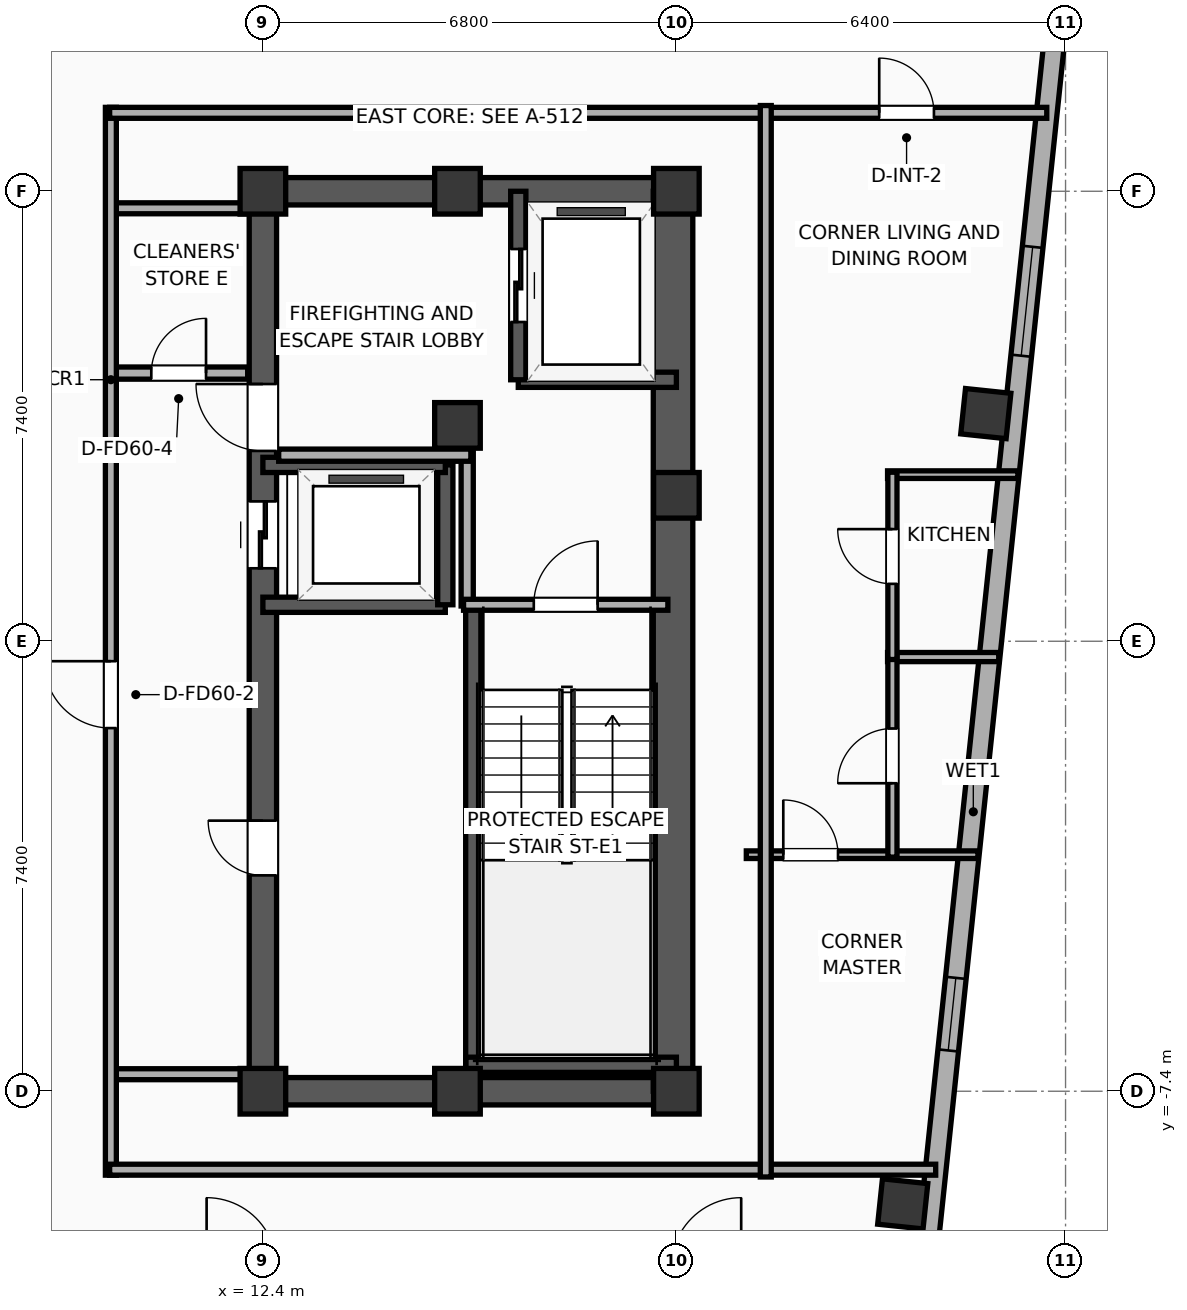
"""IFC4 building model, lengths in metres.
Left out: names, types, materials, properties, quantities, classifications, styles, units other than length and angle.
Written with IfcOpenShell. Run it as: python <this file> out.ifc"""

import sys

from ifc_helpers import new_model, si_unit, direction, frame, frame_2d, origin, origin_2d, place, context, subcontext, project, spatial, rectangle, hollow_rectangle, extrude, element, fill, save


model = new_model("IFC4")
c1 = context("Model", 3, precision=1e-05, world=origin(), true_north=direction((0.0, 1.0)))
c2 = subcontext(c1, "Body", "Model", "MODEL_VIEW")
j1 = project(units=[si_unit("LENGTHUNIT", "METRE"), si_unit("PLANEANGLEUNIT", "RADIAN")], contexts=[c1])
p1 = place(None, origin())
s1 = spatial("IfcSite", under=j1, at=p1, CompositionType="ELEMENT")
p2 = place(p1, origin())
s2 = spatial("IfcBuilding", under=s1, at=p2, CompositionType="ELEMENT")
p3 = place(p2, frame((0.0, 0.0, 267.8)))
s3 = spatial("IfcBuildingStorey", under=s2, at=p3, CompositionType="ELEMENT", Elevation=267.8)
for number, where, z_axis, x_axis in (
    (1, (12.4, -7.4, 0.0), (0.0, 0.0, 1.0), (1.0, 0.0, 0.0)),
    (2, (15.6, 3.55, 0.0), (0.0, 0.0, 1.0), (1.0, 0.0, 0.0)),
    (3, (12.4, 7.4, 0.0), (0.0, 0.0, 1.0), (1.0, 0.0, 0.0)),
    (4, (15.6, -7.4, 0.0), (0.0, 0.0, 1.0), (1.0, 0.0, 0.0)),
    (5, (15.6, 7.4, 0.0), (0.0, 0.0, 1.0), (1.0, 0.0, 0.0)),
    (6, (19.2, -7.4, 0.0), (0.0, 0.0, 1.0), (1.0, 0.0, 0.0)),
    (7, (19.2, 2.4, 0.0), (0.0, 0.0, 1.0), (1.0, 0.0, 0.0)),
    (8, (19.2, 7.4, 0.0), (0.0, 0.0, 1.0), (1.0, 0.0, 0.0)),
):
    element("IfcColumn", number, at=place(p3, frame(where, z_axis=z_axis, x_axis=x_axis)), inside=s3, PredefinedType="COLUMN", context=c2, shape_type="SweptSolid", body=[
        extrude(rectangle(XDim=0.75, YDim=0.75, at=origin_2d()), origin(), (0.0, 0.0, 1.0), 3.9),
    ])
for number, where, z_axis, x_axis in (
    (9, (12.175, -7.4, 0.0), (0.0, 0.0, 1.0), (1.0, 0.0, 0.0)),
    (10, (12.175, 7.4, 0.0), (0.0, 0.0, 1.0), (1.0, 0.0, 0.0)),
):
    element("IfcWall", number, at=place(p3, frame(where, z_axis=z_axis, x_axis=x_axis)), inside=s3, PredefinedType="SHEAR", context=c2, shape_type="SweptSolid", body=[
        extrude(rectangle(XDim=7.25, YDim=0.45, at=frame_2d((3.625, 0.0))), origin(), (0.0, 0.0, 1.0), 3.65),
    ])
p4 = place(p3, frame((12.4, -7.4, 0.0), z_axis=(0.0, 0.0, 1.0), x_axis=(0.0, 1.0, 0.0)))
e11 = element("IfcWall", 11, at=p4, inside=s3, PredefinedType="SHEAR", context=c2, shape_type="SweptSolid", body=[
    extrude(rectangle(XDim=14.8, YDim=0.45, at=frame_2d((7.4, 0.0))), origin(), (0.0, 0.0, 1.0), 3.65),
])
p5 = place(p4, frame((8.6, 0.0, 0.0)))
e12 = element("IfcOpeningElement", 12, at=p5, cuts=e11, PredefinedType="OPENING", context=c2, shape_type="SweptSolid", body=[
    extrude(rectangle(XDim=1.1, YDim=2.05, at=frame_2d((0.55, 1.025))), frame((0.0, 0.235, 0.0), z_axis=(0.0, -1.0, 0.0), x_axis=(1.0, 0.0, 0.0)), (0.0, 0.0, 1.0), 0.47),
])
p6 = place(p4, frame((10.53, 0.0, 0.0)))
e13 = element("IfcOpeningElement", 13, at=p6, cuts=e11, PredefinedType="OPENING", context=c2, shape_type="SweptSolid", body=[
    extrude(rectangle(XDim=1.1, YDim=2.05, at=frame_2d((0.55, 1.025))), frame((0.0, 0.235, 0.0), z_axis=(0.0, -1.0, 0.0), x_axis=(1.0, 0.0, 0.0)), (0.0, 0.0, 1.0), 0.47),
])
p7 = place(p4, frame((3.55, 0.0, 0.0)))
e14 = element("IfcOpeningElement", 14, at=p7, cuts=e11, PredefinedType="OPENING", context=c2, shape_type="SweptSolid", body=[
    extrude(rectangle(XDim=0.9, YDim=2.05, at=frame_2d((0.45, 1.025))), frame((0.0, 0.235, 0.0), z_axis=(0.0, -1.0, 0.0), x_axis=(1.0, 0.0, 0.0)), (0.0, 0.0, 1.0), 0.47),
])
p8 = place(p3, frame((19.145, -7.4, 0.0), z_axis=(0.0, 0.0, 1.0), x_axis=(0.0, 1.0, 0.0)))
e15 = element("IfcWall", 15, at=p8, inside=s3, PredefinedType="SHEAR", context=c2, shape_type="SweptSolid", body=[
    extrude(rectangle(XDim=14.8, YDim=0.65, at=frame_2d((7.4, 0.0))), origin(), (0.0, 0.0, 1.0), 3.65),
])
p9 = place(p3, frame((15.86, -7.085, 0.0), z_axis=(0.0, 0.0, 1.0), x_axis=(0.0, 1.0, 0.0)))
e16 = element("IfcWall", 16, at=p9, inside=s3, PredefinedType="SOLIDWALL", context=c2, shape_type="SweptSolid", body=[
    extrude(rectangle(XDim=7.685, YDim=0.25, at=frame_2d((3.843, 0.0))), origin(), (0.0, 0.0, 1.0), 3.65),
])
p10 = place(p3, frame((15.74, -6.965, 0.0), z_axis=(0.0, 0.0, 1.0), x_axis=(1.0, 0.0, 0.0)))
e17 = element("IfcWall", 17, at=p10, inside=s3, PredefinedType="SOLIDWALL", context=c2, shape_type="SweptSolid", body=[
    extrude(rectangle(XDim=3.46, YDim=0.25, at=frame_2d((1.73, 0.0))), origin(), (0.0, 0.0, 1.0), 3.65),
])
for number, where, z_axis, x_axis in (
    (18, (22.923, -9.252, 0.0), (0.0, 0.0, 1.0), (0.995, -0.105, 0.0)),
    (19, (24.289, 3.744, 0.0), (0.0, 0.0, 1.0), (0.995, -0.105, 0.0)),
):
    element("IfcColumn", number, at=place(p3, frame(where, z_axis=z_axis, x_axis=x_axis)), inside=s3, PredefinedType="COLUMN", context=c2, shape_type="SweptSolid", body=[
        extrude(hollow_rectangle(XDim=0.75, YDim=0.75, WallThickness=0.025, at=origin_2d()), origin(), (0.0, 0.0, 1.0), 3.9),
    ])
p11 = place(p3, frame((25.67, 12.296, 0.0), z_axis=(0.0, 0.0, 1.0), x_axis=(-0.104533282919, -0.994521388791, 0.0)))
e20 = element("IfcWall", 20, at=p11, inside=s3, PredefinedType="ELEMENTEDWALL", context=c2, shape_type="SweptSolid", body=[
    extrude(rectangle(XDim=30.366, YDim=0.34, at=frame_2d((15.183, 0.0))), origin(), (0.0, 0.0, 1.0), 3.65),
])
p12 = place(p11, frame((5.842, 0.0, 0.75)))
e21 = element("IfcOpeningElement", 21, at=p12, cuts=e20, PredefinedType="OPENING", context=c2, shape_type="SweptSolid", body=[
    extrude(rectangle(XDim=1.8, YDim=2.1, at=frame_2d((0.9, 1.05))), frame((0.0, 0.18, 0.0), z_axis=(0.0, -1.0, 0.0), x_axis=(1.0, 0.0, 0.0)), (0.0, 0.0, 1.0), 0.36),
])
p13 = place(p11, frame((23.525, 0.0, 0.75)))
e22 = element("IfcOpeningElement", 22, at=p13, cuts=e20, PredefinedType="OPENING", context=c2, shape_type="SweptSolid", body=[
    extrude(rectangle(XDim=1.8, YDim=2.1, at=frame_2d((0.9, 1.05))), frame((0.0, 0.18, 0.0), z_axis=(0.0, -1.0, 0.0), x_axis=(1.0, 0.0, 0.0)), (0.0, 0.0, 1.0), 0.36),
])
p14 = place(p11, frame((27.117, 0.0, 0.75)))
e23 = element("IfcOpeningElement", 23, at=p14, cuts=e20, PredefinedType="OPENING", context=c2, shape_type="SweptSolid", body=[
    extrude(rectangle(XDim=1.2, YDim=2.05, at=frame_2d((0.6, 1.025))), frame((0.0, 0.18, 0.0), z_axis=(0.0, -1.0, 0.0), x_axis=(1.0, 0.0, 0.0)), (0.0, 0.0, 1.0), 0.36),
])
p15 = place(p11, frame((17.929, 0.0, 0.75)))
e24 = element("IfcOpeningElement", 24, at=p15, cuts=e20, PredefinedType="OPENING", context=c2, shape_type="SweptSolid", body=[
    extrude(rectangle(XDim=1.2, YDim=2.05, at=frame_2d((0.6, 1.025))), frame((0.0, 0.18, 0.0), z_axis=(0.0, -1.0, 0.0), x_axis=(1.0, 0.0, 0.0)), (0.0, 0.0, 1.0), 0.36),
])
p16 = place(p3, frame((16.6, 4.3, 0.0), z_axis=(0.0, 0.0, 1.0), x_axis=(1.0, 0.0, 0.0)))
e25 = element("IfcWall", 25, at=p16, inside=s3, PredefinedType="SOLIDWALL", context=c2, shape_type="SweptSolid", body=[
    extrude(rectangle(XDim=2.6, YDim=0.25, at=frame_2d((1.3, 0.0))), origin(), (0.0, 0.0, 1.0), 3.65),
])
p17 = place(p3, frame((16.6, 7.4, 0.0), z_axis=(0.0, 0.0, 1.0), x_axis=(0.0, -1.0, 0.0)))
e26 = element("IfcWall", 26, at=p17, inside=s3, PredefinedType="SOLIDWALL", context=c2, shape_type="SweptSolid", body=[
    extrude(rectangle(XDim=3.1, YDim=0.25, at=frame_2d((1.55, 0.0))), origin(), (0.0, 0.0, 1.0), 3.65),
])
p18 = place(p17, frame((0.95, 0.0, 0.0)))
e27 = element("IfcOpeningElement", 27, at=p18, cuts=e26, PredefinedType="OPENING", context=c2, shape_type="SweptSolid", body=[
    extrude(rectangle(XDim=1.2, YDim=2.05, at=frame_2d((0.6, 1.025))), frame((0.0, 0.135, 0.0), z_axis=(0.0, -1.0, 0.0), x_axis=(1.0, 0.0, 0.0)), (0.0, 0.0, 1.0), 0.27),
])
p19 = place(p3, frame((12.4, 0.6, 0.0), z_axis=(0.0, 0.0, 1.0), x_axis=(1.0, 0.0, 0.0)))
e28 = element("IfcWall", 28, at=p19, inside=s3, PredefinedType="SOLIDWALL", context=c2, shape_type="SweptSolid", body=[
    extrude(rectangle(XDim=3.0, YDim=0.25, at=frame_2d((1.5, 0.0))), origin(), (0.0, 0.0, 1.0), 3.65),
])
p20 = place(p3, frame((15.4, 0.6, 0.0), z_axis=(0.0, 0.0, 1.0), x_axis=(0.0, 1.0, 0.0)))
e29 = element("IfcWall", 29, at=p20, inside=s3, PredefinedType="SOLIDWALL", context=c2, shape_type="SweptSolid", body=[
    extrude(rectangle(XDim=2.3, YDim=0.25, at=frame_2d((1.15, 0.0))), origin(), (0.0, 0.0, 1.0), 3.65),
])
p21 = place(p3, frame((15.4, 2.9, 0.0), z_axis=(0.0, 0.0, 1.0), x_axis=(-1.0, 0.0, 0.0)))
e30 = element("IfcWall", 30, at=p21, inside=s3, PredefinedType="SOLIDWALL", context=c2, shape_type="SweptSolid", body=[
    extrude(rectangle(XDim=3.0, YDim=0.25, at=frame_2d((1.5, 0.0))), origin(), (0.0, 0.0, 1.0), 3.65),
])
p22 = place(p3, frame((15.76, 0.58, 0.0), z_axis=(0.0, 0.0, 1.0), x_axis=(0.0, 1.0, 0.0)))
e31 = element("IfcWall", 31, at=p22, inside=s3, PredefinedType="PARTITIONING", context=c2, shape_type="SweptSolid", body=[
    extrude(rectangle(XDim=2.52, YDim=0.2, at=frame_2d((1.26, 0.0))), origin(), (0.0, 0.0, 1.0), 3.65),
])
p23 = place(p3, frame((12.66, 3.06, 0.0), z_axis=(0.0, 0.0, 1.0), x_axis=(1.0, 0.0, 0.0)))
e32 = element("IfcWall", 32, at=p23, inside=s3, PredefinedType="PARTITIONING", context=c2, shape_type="SweptSolid", body=[
    extrude(rectangle(XDim=3.16, YDim=0.2, at=frame_2d((1.58, 0.0))), origin(), (0.0, 0.0, 1.0), 3.65),
])
p24 = place(p3, frame((15.7, 0.6, 0.0), z_axis=(0.0, 0.0, 1.0), x_axis=(1.0, 0.0, 0.0)))
e33 = element("IfcWall", 33, at=p24, inside=s3, PredefinedType="PARTITIONING", context=c2, shape_type="SweptSolid", body=[
    extrude(rectangle(XDim=3.36, YDim=0.18, at=frame_2d((1.68, 0.0))), origin(), (0.0, 0.0, 1.0), 3.65),
])
p25 = place(p24, frame((1.155, 0.0, 0.0)))
e34 = element("IfcOpeningElement", 34, at=p25, cuts=e33, PredefinedType="OPENING", context=c2, shape_type="SweptSolid", body=[
    extrude(rectangle(XDim=1.05, YDim=2.05, at=frame_2d((0.525, 1.025))), frame((0.0, 0.1, 0.0), z_axis=(0.0, -1.0, 0.0), x_axis=(1.0, 0.0, 0.0)), (0.0, 0.0, 1.0), 0.2),
])
p26 = place(p3, frame((9.88, 4.41, 0.0), z_axis=(0.0, 0.0, 1.0), x_axis=(1.0, 0.0, 0.0)))
e35 = element("IfcWall", 35, at=p26, inside=s3, PredefinedType="PARTITIONING", context=c2, shape_type="SweptSolid", body=[
    extrude(rectangle(XDim=2.27, YDim=0.2, at=frame_2d((1.135, 0.0))), origin(), (0.0, 0.0, 1.0), 3.65),
])
p27 = place(p26, frame((0.685, 0.0, 0.0)))
e36 = element("IfcOpeningElement", 36, at=p27, cuts=e35, PredefinedType="OPENING", context=c2, shape_type="SweptSolid", body=[
    extrude(rectangle(XDim=0.9, YDim=2.05, at=frame_2d((0.45, 1.025))), frame((0.0, 0.11, 0.0), z_axis=(0.0, -1.0, 0.0), x_axis=(1.0, 0.0, 0.0)), (0.0, 0.0, 1.0), 0.22),
])
for number, where, z_axis, x_axis in (
    (37, (9.88, 7.12, 0.0), (0.0, 0.0, 1.0), (1.0, 0.0, 0.0)),
    (38, (9.88, -7.12, 0.0), (0.0, 0.0, 1.0), (1.0, 0.0, 0.0)),
):
    element("IfcWall", number, at=place(p3, frame(where, z_axis=z_axis, x_axis=x_axis)), inside=s3, PredefinedType="PARTITIONING", context=c2, shape_type="SweptSolid", body=[
        extrude(rectangle(XDim=2.27, YDim=0.18, at=frame_2d((1.135, 0.0))), origin(), (0.0, 0.0, 1.0), 3.65),
    ])
p28 = place(p3, frame((9.9, -8.78, 0.0), z_axis=(0.0, 0.0, 1.0), x_axis=(0.0, 1.0, 0.0)))
e39 = element("IfcWall", 39, at=p28, inside=s3, PredefinedType="PARTITIONING", context=c2, shape_type="SweptSolid", body=[
    extrude(rectangle(XDim=17.56, YDim=0.18, at=frame_2d((8.78, 0.0))), origin(), (0.0, 0.0, 1.0), 3.65),
])
p29 = place(p28, frame((7.352, 0.0, 0.0)))
e40 = element("IfcOpeningElement", 40, at=p29, cuts=e39, PredefinedType="OPENING", context=c2, shape_type="SweptSolid", body=[
    extrude(rectangle(XDim=1.1, YDim=2.05, at=frame_2d((0.55, 1.025))), frame((0.0, 0.1, 0.0), z_axis=(0.0, -1.0, 0.0), x_axis=(1.0, 0.0, 0.0)), (0.0, 0.0, 1.0), 0.2),
])
p30 = place(p3, frame((9.88, 8.69, 0.0), z_axis=(0.0, 0.0, 1.0), x_axis=(1.0, 0.0, 0.0)))
e41 = element("IfcWall", 41, at=p30, inside=s3, PredefinedType="PARTITIONING", context=c2, shape_type="SweptSolid", body=[
    extrude(rectangle(XDim=15.411, YDim=0.18, at=frame_2d((7.706, 0.0))), origin(), (0.0, 0.0, 1.0), 3.65),
])
p31 = place(p30, frame((12.656, 0.0, 0.0)))
e42 = element("IfcOpeningElement", 42, at=p31, cuts=e41, PredefinedType="OPENING", context=c2, shape_type="SweptSolid", body=[
    extrude(rectangle(XDim=0.9, YDim=2.05, at=frame_2d((0.45, 1.025))), frame((0.0, 0.1, 0.0), z_axis=(0.0, -1.0, 0.0), x_axis=(1.0, 0.0, 0.0)), (0.0, 0.0, 1.0), 0.2),
])
p32 = place(p3, frame((9.88, -8.69, 0.0), z_axis=(0.0, 0.0, 1.0), x_axis=(1.0, 0.0, 0.0)))
e43 = element("IfcWall", 43, at=p32, inside=s3, PredefinedType="PARTITIONING", context=c2, shape_type="SweptSolid", body=[
    extrude(rectangle(XDim=13.584, YDim=0.18, at=frame_2d((6.792, 0.0))), origin(), (0.0, 0.0, 1.0), 3.65),
])
p33 = place(p3, frame((22.673, 2.74, 0.0), z_axis=(0.0, 0.0, 1.0), x_axis=(1.0, 0.0, 0.0)))
e44 = element("IfcWall", 44, at=p33, inside=s3, PredefinedType="PARTITIONING", context=c2, shape_type="SweptSolid", body=[
    extrude(rectangle(XDim=2.144, YDim=0.125, at=frame_2d((1.072, 0.0))), origin(), (0.0, 0.0, 1.0), 3.65),
])
p34 = place(p3, frame((22.673, -0.26, 0.0), z_axis=(0.0, 0.0, 1.0), x_axis=(1.0, 0.0, 0.0)))
e45 = element("IfcWall", 45, at=p34, inside=s3, PredefinedType="PLUMBINGWALL", context=c2, shape_type="SweptSolid", body=[
    extrude(rectangle(XDim=1.828, YDim=0.15, at=frame_2d((0.914, 0.0))), origin(), (0.0, 0.0, 1.0), 3.65),
])
p35 = place(p3, frame((20.35, -3.51, 0.0), z_axis=(0.0, 0.0, 1.0), x_axis=(1.0, 0.0, 0.0)))
e46 = element("IfcWall", 46, at=p35, inside=s3, PredefinedType="PARTITIONING", context=c2, shape_type="SweptSolid", body=[
    extrude(rectangle(XDim=3.81, YDim=0.125, at=frame_2d((1.905, 0.0))), origin(), (0.0, 0.0, 1.0), 3.65),
])
p36 = place(p35, frame((0.608, 0.0, 0.0)))
e47 = element("IfcOpeningElement", 47, at=p36, cuts=e46, PredefinedType="OPENING", context=c2, shape_type="SweptSolid", body=[
    extrude(rectangle(XDim=0.9, YDim=2.05, at=frame_2d((0.45, 1.025))), frame((0.0, 0.073, 0.0), z_axis=(0.0, -1.0, 0.0), x_axis=(1.0, 0.0, 0.0)), (0.0, 0.0, 1.0), 0.145),
])
p37 = place(p3, frame((22.753, -3.55, 0.0), z_axis=(0.0, 0.0, 1.0), x_axis=(0.0, 1.0, 0.0)))
e48 = element("IfcWall", 48, at=p37, inside=s3, PredefinedType="PLUMBINGWALL", context=c2, shape_type="SweptSolid", body=[
    extrude(rectangle(XDim=3.33, YDim=0.15, at=frame_2d((1.665, 0.0))), origin(), (0.0, 0.0, 1.0), 3.65),
])
p38 = place(p37, frame((1.215, 0.0, 0.0)))
e49 = element("IfcOpeningElement", 49, at=p38, cuts=e48, PredefinedType="OPENING", context=c2, shape_type="SweptSolid", body=[
    extrude(rectangle(XDim=0.9, YDim=2.05, at=frame_2d((0.45, 1.025))), frame((0.0, 0.085, 0.0), z_axis=(0.0, -1.0, 0.0), x_axis=(1.0, 0.0, 0.0)), (0.0, 0.0, 1.0), 0.17),
])
p39 = place(p3, frame((22.753, -0.3, 0.0), z_axis=(0.0, 0.0, 1.0), x_axis=(0.0, 1.0, 0.0)))
e50 = element("IfcWall", 50, at=p39, inside=s3, PredefinedType="PLUMBINGWALL", context=c2, shape_type="SweptSolid", body=[
    extrude(rectangle(XDim=3.08, YDim=0.15, at=frame_2d((1.54, 0.0))), origin(), (0.0, 0.0, 1.0), 3.65),
])
p40 = place(p39, frame((1.244, 0.0, 0.0)))
e51 = element("IfcOpeningElement", 51, at=p40, cuts=e50, PredefinedType="OPENING", context=c2, shape_type="SweptSolid", body=[
    extrude(rectangle(XDim=0.9, YDim=2.05, at=frame_2d((0.45, 1.025))), frame((0.0, 0.085, 0.0), z_axis=(0.0, -1.0, 0.0), x_axis=(1.0, 0.0, 0.0)), (0.0, 0.0, 1.0), 0.17),
])
p41 = place(p3, frame((20.67, -8.81, 0.0), z_axis=(0.0, 0.0, 1.0), x_axis=(0.0, 1.0, 0.0)))
e52 = element("IfcWall", 52, at=p41, inside=s3, PredefinedType="PARTITIONING", context=c2, shape_type="SweptSolid", body=[
    extrude(rectangle(XDim=17.62, YDim=0.18, at=frame_2d((8.81, 0.0))), origin(), (0.0, 0.0, 1.0), 3.65),
])
p42 = place(p12, origin())
e53 = element("IfcWindow", 53, at=p42, inside=s3, PartitioningType="SINGLE_PANEL", PredefinedType="WINDOW", context=c2, shape_type="SweptSolid", body=[
    extrude(rectangle(XDim=1.8, YDim=2.1, at=frame_2d((0.9, 1.05))), frame((0.0, 0.03, 0.0), z_axis=(0.0, -1.0, 0.0), x_axis=(1.0, 0.0, 0.0)), (0.0, 0.0, 1.0), 0.06),
])
fill(e21, e53)
p43 = place(p15, origin())
e54 = element("IfcWindow", 54, at=p43, inside=s3, PartitioningType="SINGLE_PANEL", PredefinedType="WINDOW", context=c2, shape_type="SweptSolid", body=[
    extrude(rectangle(XDim=1.2, YDim=2.05, at=frame_2d((0.6, 1.025))), frame((0.0, 0.03, 0.0), z_axis=(0.0, -1.0, 0.0), x_axis=(1.0, 0.0, 0.0)), (0.0, 0.0, 1.0), 0.06),
])
fill(e24, e54)
p44 = place(p18, origin())
e55 = element("IfcDoor", 55, at=p44, inside=s3, OperationType="SLIDING_TO_LEFT", PredefinedType="DOOR", context=c2, shape_type="SweptSolid", body=[
    extrude(rectangle(XDim=1.2, YDim=2.05, at=frame_2d((0.6, 1.025))), frame((0.0, 0.025, 0.0), z_axis=(0.0, -1.0, 0.0), x_axis=(1.0, 0.0, 0.0)), (0.0, 0.0, 1.0), 0.05),
])
fill(e27, e55)
p45 = place(p5, origin())
e56 = element("IfcDoor", 56, at=p45, inside=s3, OperationType="SLIDING_TO_LEFT", PredefinedType="DOOR", context=c2, shape_type="SweptSolid", body=[
    extrude(rectangle(XDim=1.1, YDim=2.05, at=frame_2d((0.55, 1.025))), frame((0.0, 0.025, 0.0), z_axis=(0.0, -1.0, 0.0), x_axis=(1.0, 0.0, 0.0)), (0.0, 0.0, 1.0), 0.05),
])
fill(e12, e56)
p46 = place(p25, origin())
e57 = element("IfcDoor", 57, at=p46, inside=s3, OperationType="SINGLE_SWING_RIGHT", PredefinedType="DOOR", context=c2, shape_type="SweptSolid", body=[
    extrude(rectangle(XDim=1.05, YDim=2.05, at=frame_2d((0.525, 1.025))), frame((0.0, 0.025, 0.0), z_axis=(0.0, -1.0, 0.0), x_axis=(1.0, 0.0, 0.0)), (0.0, 0.0, 1.0), 0.05),
])
fill(e34, e57)
p47 = place(p27, origin())
e58 = element("IfcDoor", 58, at=p47, inside=s3, OperationType="SINGLE_SWING_RIGHT", PredefinedType="DOOR", context=c2, shape_type="SweptSolid", body=[
    extrude(rectangle(XDim=0.9, YDim=2.05, at=frame_2d((0.45, 1.025))), frame((0.0, 0.025, 0.0), z_axis=(0.0, -1.0, 0.0), x_axis=(1.0, 0.0, 0.0)), (0.0, 0.0, 1.0), 0.05),
])
fill(e36, e58)
p48 = place(p29, origin())
e59 = element("IfcDoor", 59, at=p48, inside=s3, OperationType="SINGLE_SWING_RIGHT", PredefinedType="DOOR", context=c2, shape_type="SweptSolid", body=[
    extrude(rectangle(XDim=1.1, YDim=2.05, at=frame_2d((0.55, 1.025))), frame((0.0, 0.025, 0.0), z_axis=(0.0, -1.0, 0.0), x_axis=(1.0, 0.0, 0.0)), (0.0, 0.0, 1.0), 0.05),
])
fill(e40, e59)
p49 = place(p31, origin())
e60 = element("IfcDoor", 60, at=p49, inside=s3, OperationType="SINGLE_SWING_LEFT", PredefinedType="DOOR", context=c2, shape_type="SweptSolid", body=[
    extrude(rectangle(XDim=0.9, YDim=2.05, at=frame_2d((0.45, 1.025))), frame((0.0, 0.025, 0.0), z_axis=(0.0, -1.0, 0.0), x_axis=(1.0, 0.0, 0.0)), (0.0, 0.0, 1.0), 0.05),
])
fill(e42, e60)
p50 = place(p36, origin())
e61 = element("IfcDoor", 61, at=p50, inside=s3, OperationType="SINGLE_SWING_LEFT", PredefinedType="DOOR", context=c2, shape_type="SweptSolid", body=[
    extrude(rectangle(XDim=0.9, YDim=2.05, at=frame_2d((0.45, 1.025))), frame((0.0, 0.025, 0.0), z_axis=(0.0, -1.0, 0.0), x_axis=(1.0, 0.0, 0.0)), (0.0, 0.0, 1.0), 0.05),
])
fill(e47, e61)
p51 = place(p38, origin())
e62 = element("IfcDoor", 62, at=p51, inside=s3, OperationType="SINGLE_SWING_LEFT", PredefinedType="DOOR", context=c2, shape_type="SweptSolid", body=[
    extrude(rectangle(XDim=0.9, YDim=2.05, at=frame_2d((0.45, 1.025))), frame((0.0, 0.025, 0.0), z_axis=(0.0, -1.0, 0.0), x_axis=(1.0, 0.0, 0.0)), (0.0, 0.0, 1.0), 0.05),
])
fill(e49, e62)
p52 = place(p40, origin())
e63 = element("IfcDoor", 63, at=p52, inside=s3, OperationType="SINGLE_SWING_RIGHT", PredefinedType="DOOR", context=c2, shape_type="SweptSolid", body=[
    extrude(rectangle(XDim=0.9, YDim=2.05, at=frame_2d((0.45, 1.025))), frame((0.0, 0.025, 0.0), z_axis=(0.0, -1.0, 0.0), x_axis=(1.0, 0.0, 0.0)), (0.0, 0.0, 1.0), 0.05),
])
fill(e51, e63)
p53 = place(p6, origin())
e64 = element("IfcDoor", 64, at=p53, inside=s3, OperationType="SINGLE_SWING_RIGHT", PredefinedType="DOOR", context=c2, shape_type="SweptSolid", body=[
    extrude(rectangle(XDim=1.1, YDim=2.05, at=frame_2d((0.55, 1.025))), frame((0.0, 0.025, 0.0), z_axis=(0.0, -1.0, 0.0), x_axis=(1.0, 0.0, 0.0)), (0.0, 0.0, 1.0), 0.05),
])
fill(e13, e64)
p54 = place(p7, origin())
e65 = element("IfcDoor", 65, at=p54, inside=s3, OperationType="SINGLE_SWING_RIGHT", PredefinedType="DOOR", context=c2, shape_type="SweptSolid", body=[
    extrude(rectangle(XDim=0.9, YDim=2.05, at=frame_2d((0.45, 1.025))), frame((0.0, 0.025, 0.0), z_axis=(0.0, -1.0, 0.0), x_axis=(1.0, 0.0, 0.0)), (0.0, 0.0, 1.0), 0.05),
])
fill(e14, e65)
save(model, sys.argv[1])
